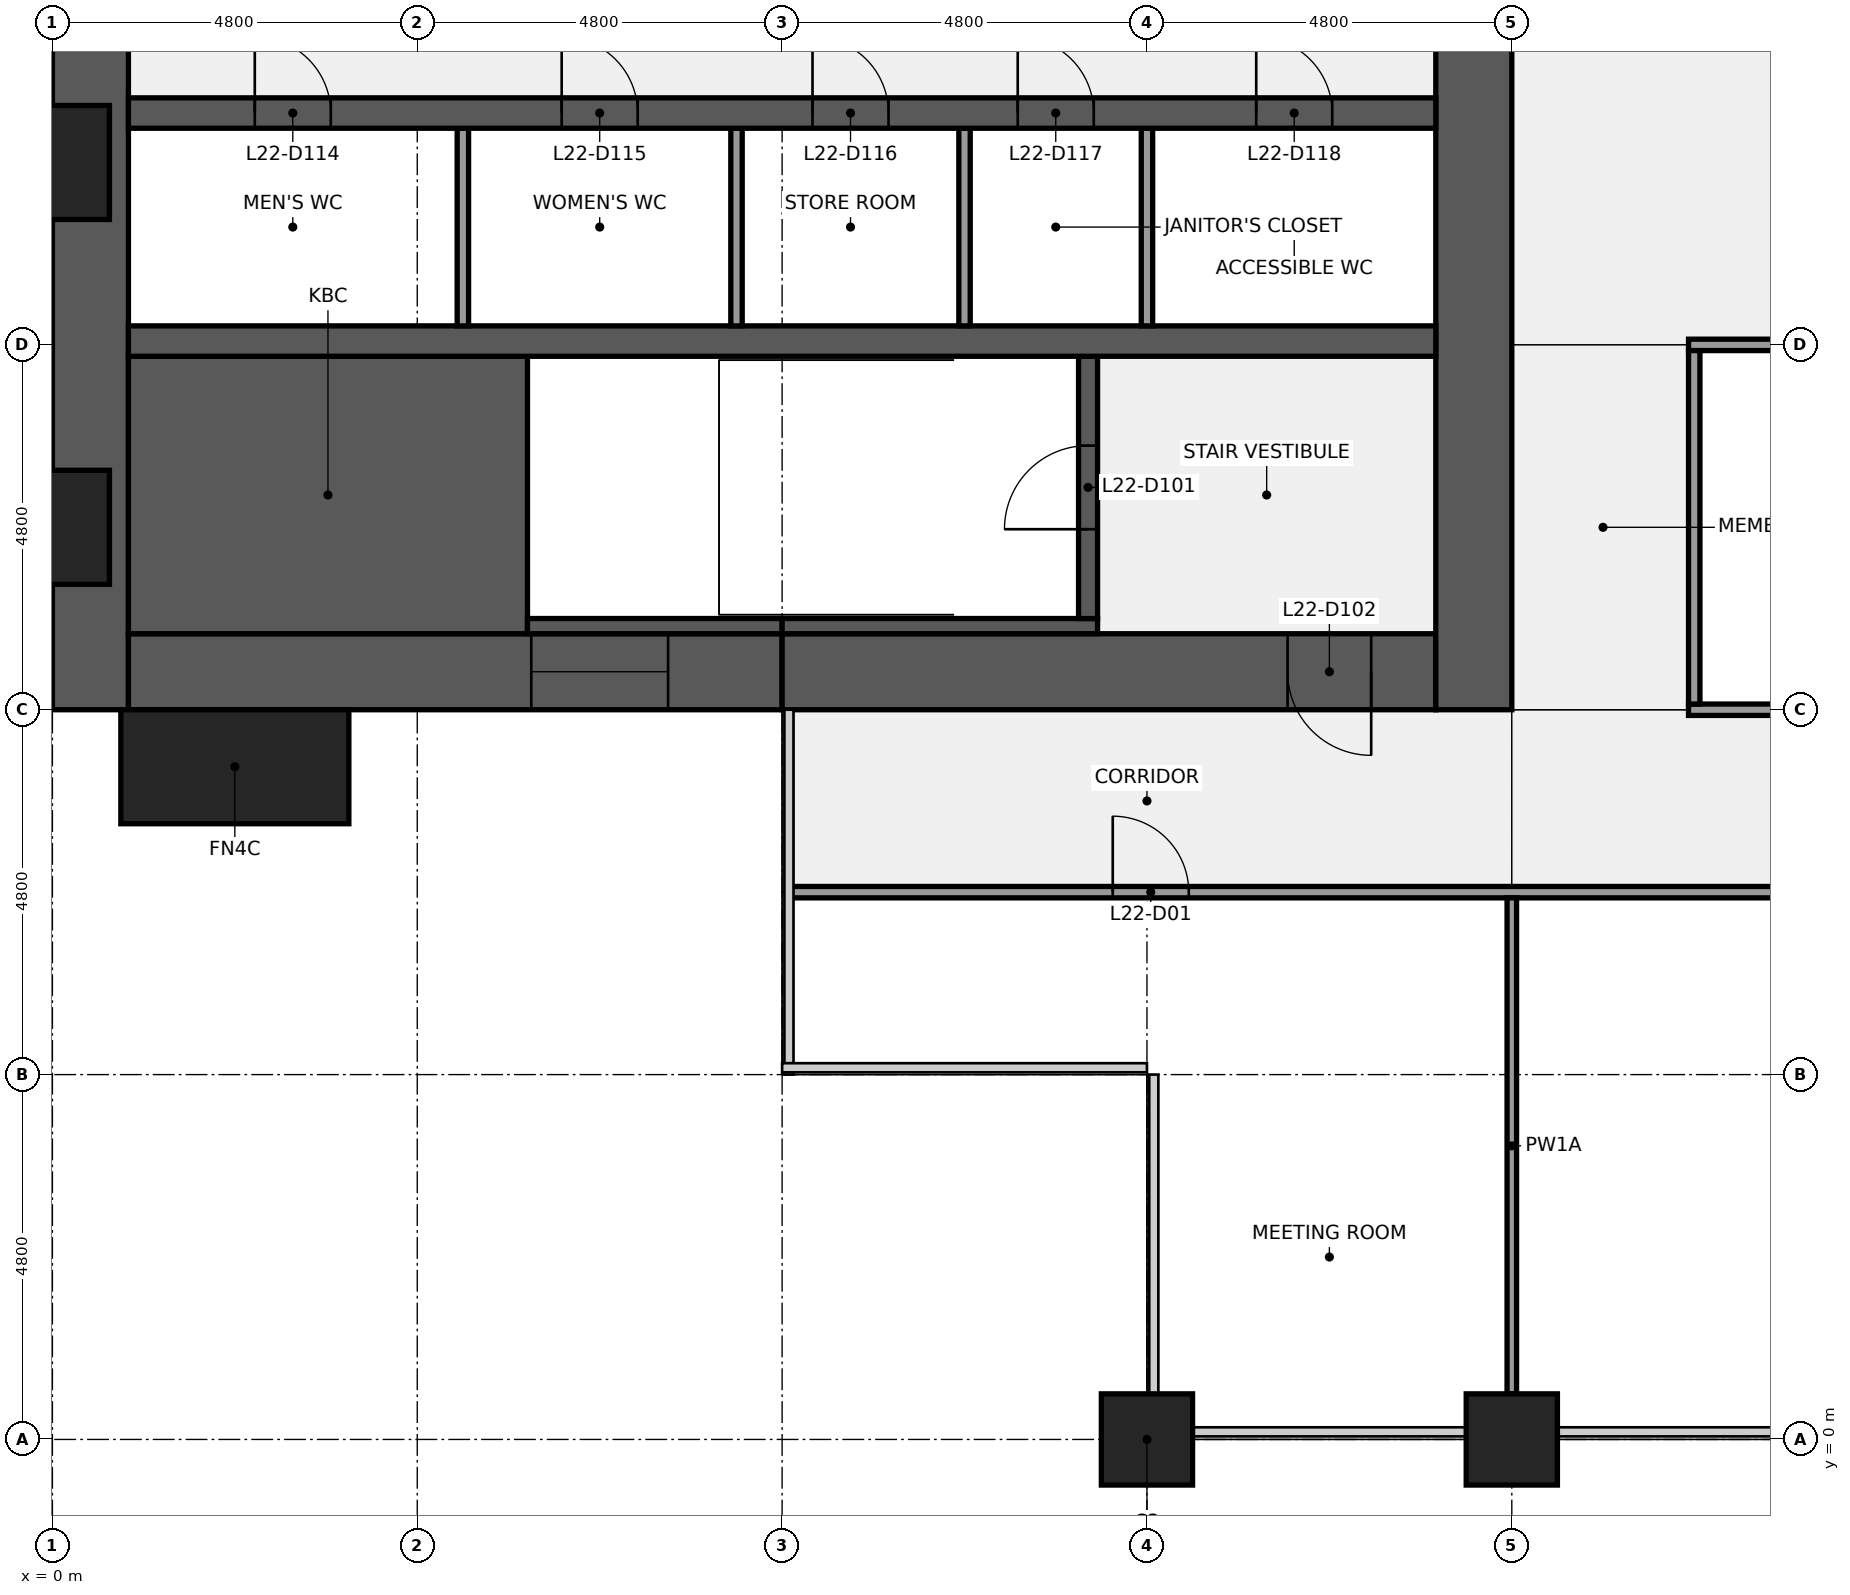
"""IFC4 building model, lengths in metres.
Left out: names, types, materials, properties, quantities, classifications, styles, units other than length and angle.
Written with IfcOpenShell. Run it as: python <this file> out.ifc"""

import sys

from ifc_helpers import new_model, si_unit, direction, frame, frame_2d, origin, origin_2d, place, context, subcontext, project, spatial, rectangle, extrude, element, fill, save


model = new_model("IFC4")
c1 = context("Model", 3, precision=1e-05, world=origin(), true_north=direction((0.0, 1.0)))
c2 = subcontext(c1, "Body", "Model", "MODEL_VIEW")
j1 = project(units=[si_unit("LENGTHUNIT", "METRE"), si_unit("PLANEANGLEUNIT", "RADIAN")], contexts=[c1])
p1 = place(None, origin())
s1 = spatial("IfcSite", under=j1, at=p1, CompositionType="ELEMENT")
p2 = place(p1, origin())
s2 = spatial("IfcBuilding", under=s1, at=p2, CompositionType="ELEMENT")
p3 = place(p2, frame((0.0, 0.0, 108.1)))
s3 = spatial("IfcBuildingStorey", under=s2, at=p3, CompositionType="ELEMENT", Elevation=108.1)
for number, where, z_axis, x_axis in (
    (1, (14.4, 0.0, 0.0), (0.0, 0.0, 1.0), (1.0, 0.0, 0.0)),
    (2, (19.2, 0.0, 0.0), (0.0, 0.0, 1.0), (1.0, 0.0, 0.0)),
):
    element("IfcColumn", number, at=place(p3, frame(where, z_axis=z_axis, x_axis=x_axis)), inside=s3, PredefinedType="COLUMN", context=c2, shape_type="SweptSolid", body=[
        extrude(rectangle(XDim=1.2, YDim=1.2, at=origin_2d()), origin(), (0.0, 0.0, 1.0), 4.0),
    ])
p4 = place(p3, frame((0.5, 9.6, 0.0), z_axis=(0.0, 0.0, 1.0), x_axis=(0.0, 1.0, 0.0)))
e3 = element("IfcWall", 3, at=p4, inside=s3, PredefinedType="SHEAR", context=c2, shape_type="SweptSolid", body=[
    extrude(rectangle(XDim=28.8, YDim=1.0, at=frame_2d((14.4, 0.0))), origin(), (0.0, 0.0, 1.0), 3.84),
])
p5 = place(p4, frame((8.85, 0.0, 0.9)))
e4 = element("IfcOpeningElement", 4, at=p5, cuts=e3, PredefinedType="OPENING", context=c2, shape_type="SweptSolid", body=[
    extrude(rectangle(XDim=1.5, YDim=1.5, at=frame_2d((0.75, 0.75))), frame((0.0, 0.51, 0.0), z_axis=(0.0, -1.0, 0.0), x_axis=(1.0, 0.0, 0.0)), (0.0, 0.0, 1.0), 1.02),
])
p6 = place(p4, frame((18.45, 0.0, 0.9)))
e5 = element("IfcOpeningElement", 5, at=p6, cuts=e3, PredefinedType="OPENING", context=c2, shape_type="SweptSolid", body=[
    extrude(rectangle(XDim=1.5, YDim=1.5, at=frame_2d((0.75, 0.75))), frame((0.0, 0.51, 0.0), z_axis=(0.0, -1.0, 0.0), x_axis=(1.0, 0.0, 0.0)), (0.0, 0.0, 1.0), 1.02),
])
p7 = place(p3, frame((9.6, 10.1, 0.0), z_axis=(0.0, 0.0, 1.0), x_axis=(-1.0, 0.0, 0.0)))
e6 = element("IfcWall", 6, at=p7, inside=s3, PredefinedType="SHEAR", context=c2, shape_type="SweptSolid", body=[
    extrude(rectangle(XDim=8.6, YDim=1.0, at=frame_2d((4.3, 0.0))), origin(), (0.0, 0.0, 1.0), 3.84),
])
p8 = place(p7, frame((1.5, 0.0, 0.9)))
e7 = element("IfcOpeningElement", 7, at=p8, cuts=e6, PredefinedType="OPENING", context=c2, shape_type="SweptSolid", body=[
    extrude(rectangle(XDim=1.8, YDim=1.5, at=frame_2d((0.9, 0.75))), frame((0.0, 0.51, 0.0), z_axis=(0.0, -1.0, 0.0), x_axis=(1.0, 0.0, 0.0)), (0.0, 0.0, 1.0), 1.02),
])
p9 = place(p3, frame((18.2, 10.1, 0.0), z_axis=(0.0, 0.0, 1.0), x_axis=(-1.0, 0.0, 0.0)))
e8 = element("IfcWall", 8, at=p9, inside=s3, PredefinedType="SHEAR", context=c2, shape_type="SweptSolid", body=[
    extrude(rectangle(XDim=8.6, YDim=1.0, at=frame_2d((4.3, 0.0))), origin(), (0.0, 0.0, 1.0), 3.84),
])
p10 = place(p9, frame((0.85, 0.0, 0.0)))
e9 = element("IfcOpeningElement", 9, at=p10, cuts=e8, PredefinedType="OPENING", context=c2, shape_type="SweptSolid", body=[
    extrude(rectangle(XDim=1.1, YDim=2.1, at=frame_2d((0.55, 1.05))), frame((0.0, 0.51, 0.0), z_axis=(0.0, -1.0, 0.0), x_axis=(1.0, 0.0, 0.0)), (0.0, 0.0, 1.0), 1.02),
])
p11 = place(p3, frame((18.7, 38.4, 0.0), z_axis=(0.0, 0.0, 1.0), x_axis=(0.0, -1.0, 0.0)))
e10 = element("IfcWall", 10, at=p11, inside=s3, PredefinedType="SHEAR", context=c2, shape_type="SweptSolid", body=[
    extrude(rectangle(XDim=28.8, YDim=1.0, at=frame_2d((14.4, 0.0))), origin(), (0.0, 0.0, 1.0), 3.84),
])
p12 = place(p11, frame((18.3, 0.0, 0.0)))
e11 = element("IfcOpeningElement", 11, at=p12, cuts=e10, PredefinedType="OPENING", context=c2, shape_type="SweptSolid", body=[
    extrude(rectangle(XDim=1.8, YDim=2.1, at=frame_2d((0.9, 1.05))), frame((0.0, 0.51, 0.0), z_axis=(0.0, -1.0, 0.0), x_axis=(1.0, 0.0, 0.0)), (0.0, 0.0, 1.0), 1.02),
])
p13 = place(p11, frame((8.7, 0.0, 0.0)))
e12 = element("IfcOpeningElement", 12, at=p13, cuts=e10, PredefinedType="OPENING", context=c2, shape_type="SweptSolid", body=[
    extrude(rectangle(XDim=1.8, YDim=2.1, at=frame_2d((0.9, 1.05))), frame((0.0, 0.51, 0.0), z_axis=(0.0, -1.0, 0.0), x_axis=(1.0, 0.0, 0.0)), (0.0, 0.0, 1.0), 1.02),
])
p14 = place(p3, frame((1.0, 12.425, 0.0), z_axis=(0.0, 0.0, 1.0), x_axis=(1.0, 0.0, 0.0)))
e13 = element("IfcWall", 13, at=p14, inside=s3, PredefinedType="SHEAR", context=c2, shape_type="SweptSolid", body=[
    extrude(rectangle(XDim=5.25, YDim=3.65, at=frame_2d((2.625, 0.0))), origin(), (0.0, 0.0, 1.0), 3.84),
])
p15 = place(p3, frame((6.25, 10.7, 0.0), z_axis=(0.0, 0.0, 1.0), x_axis=(1.0, 0.0, 0.0)))
e14 = element("IfcWall", 14, at=p15, inside=s3, PredefinedType="SHEAR", context=c2, shape_type="SweptSolid", body=[
    extrude(rectangle(XDim=3.35, YDim=0.2, at=frame_2d((1.675, 0.0))), origin(), (0.0, 0.0, 1.0), 3.84),
])
p16 = place(p3, frame((9.6, 10.7, 0.0), z_axis=(0.0, 0.0, 1.0), x_axis=(1.0, 0.0, 0.0)))
e15 = element("IfcWall", 15, at=p16, inside=s3, PredefinedType="SHEAR", context=c2, shape_type="SweptSolid", body=[
    extrude(rectangle(XDim=4.15, YDim=0.2, at=frame_2d((2.075, 0.0))), origin(), (0.0, 0.0, 1.0), 3.84),
])
p17 = place(p3, frame((13.625, 10.8, 0.0), z_axis=(0.0, 0.0, 1.0), x_axis=(0.0, 1.0, 0.0)))
e16 = element("IfcWall", 16, at=p17, inside=s3, PredefinedType="SHEAR", context=c2, shape_type="SweptSolid", body=[
    extrude(rectangle(XDim=3.45, YDim=0.25, at=frame_2d((1.725, 0.0))), origin(), (0.0, 0.0, 1.0), 3.84),
])
p18 = place(p17, frame((1.175, 0.0, 0.0)))
e17 = element("IfcOpeningElement", 17, at=p18, cuts=e16, PredefinedType="OPENING", context=c2, shape_type="SweptSolid", body=[
    extrude(rectangle(XDim=1.1, YDim=2.1, at=frame_2d((0.55, 1.05))), frame((0.0, 0.135, 0.0), z_axis=(0.0, -1.0, 0.0), x_axis=(1.0, 0.0, 0.0)), (0.0, 0.0, 1.0), 0.27),
])
p19 = place(p3, frame((1.0, 14.45, 0.0), z_axis=(0.0, 0.0, 1.0), x_axis=(1.0, 0.0, 0.0)))
e18 = element("IfcWall", 18, at=p19, inside=s3, PredefinedType="SHEAR", context=c2, shape_type="SweptSolid", body=[
    extrude(rectangle(XDim=17.2, YDim=0.4, at=frame_2d((8.6, 0.0))), origin(), (0.0, 0.0, 1.0), 3.84),
])
for number, where, z_axis, x_axis in (
    (19, (5.4, 14.65, 0.0), (0.0, 0.0, 1.0), (0.0, 1.0, 0.0)),
    (20, (9.0, 14.65, 0.0), (0.0, 0.0, 1.0), (0.0, 1.0, 0.0)),
    (21, (12.0, 14.65, 0.0), (0.0, 0.0, 1.0), (0.0, 1.0, 0.0)),
    (22, (14.4, 14.65, 0.0), (0.0, 0.0, 1.0), (0.0, 1.0, 0.0)),
):
    element("IfcWall", number, at=place(p3, frame(where, z_axis=z_axis, x_axis=x_axis)), inside=s3, PredefinedType="PARTITIONING", context=c2, shape_type="SweptSolid", body=[
        extrude(rectangle(XDim=2.6, YDim=0.15, at=frame_2d((1.3, 0.0))), origin(), (0.0, 0.0, 1.0), 3.84),
    ])
p20 = place(p3, frame((1.0, 17.45, 0.0), z_axis=(0.0, 0.0, 1.0), x_axis=(1.0, 0.0, 0.0)))
e23 = element("IfcWall", 23, at=p20, inside=s3, PredefinedType="SHEAR", context=c2, shape_type="SweptSolid", body=[
    extrude(rectangle(XDim=17.2, YDim=0.4, at=frame_2d((8.6, 0.0))), origin(), (0.0, 0.0, 1.0), 3.84),
])
p21 = place(p20, frame((1.663, 0.0, 0.0)))
e24 = element("IfcOpeningElement", 24, at=p21, cuts=e23, PredefinedType="OPENING", context=c2, shape_type="SweptSolid", body=[
    extrude(rectangle(XDim=1.0, YDim=2.1, at=frame_2d((0.5, 1.05))), frame((0.0, 0.21, 0.0), z_axis=(0.0, -1.0, 0.0), x_axis=(1.0, 0.0, 0.0)), (0.0, 0.0, 1.0), 0.42),
])
p22 = place(p20, frame((5.7, 0.0, 0.0)))
e25 = element("IfcOpeningElement", 25, at=p22, cuts=e23, PredefinedType="OPENING", context=c2, shape_type="SweptSolid", body=[
    extrude(rectangle(XDim=1.0, YDim=2.1, at=frame_2d((0.5, 1.05))), frame((0.0, 0.21, 0.0), z_axis=(0.0, -1.0, 0.0), x_axis=(1.0, 0.0, 0.0)), (0.0, 0.0, 1.0), 0.42),
])
p23 = place(p20, frame((9.0, 0.0, 0.0)))
e26 = element("IfcOpeningElement", 26, at=p23, cuts=e23, PredefinedType="OPENING", context=c2, shape_type="SweptSolid", body=[
    extrude(rectangle(XDim=1.0, YDim=2.1, at=frame_2d((0.5, 1.05))), frame((0.0, 0.21, 0.0), z_axis=(0.0, -1.0, 0.0), x_axis=(1.0, 0.0, 0.0)), (0.0, 0.0, 1.0), 0.42),
])
p24 = place(p20, frame((11.7, 0.0, 0.0)))
e27 = element("IfcOpeningElement", 27, at=p24, cuts=e23, PredefinedType="OPENING", context=c2, shape_type="SweptSolid", body=[
    extrude(rectangle(XDim=1.0, YDim=2.1, at=frame_2d((0.5, 1.05))), frame((0.0, 0.21, 0.0), z_axis=(0.0, -1.0, 0.0), x_axis=(1.0, 0.0, 0.0)), (0.0, 0.0, 1.0), 0.42),
])
p25 = place(p20, frame((14.837, 0.0, 0.0)))
e28 = element("IfcOpeningElement", 28, at=p25, cuts=e23, PredefinedType="OPENING", context=c2, shape_type="SweptSolid", body=[
    extrude(rectangle(XDim=1.0, YDim=2.1, at=frame_2d((0.5, 1.05))), frame((0.0, 0.21, 0.0), z_axis=(0.0, -1.0, 0.0), x_axis=(1.0, 0.0, 0.0)), (0.0, 0.0, 1.0), 0.42),
])
p26 = place(p3, frame((9.7, 7.2, 0.0), z_axis=(0.0, 0.0, 1.0), x_axis=(1.0, 0.0, 0.0)))
e29 = element("IfcWall", 29, at=p26, inside=s3, PredefinedType="PARTITIONING", context=c2, shape_type="SweptSolid", body=[
    extrude(rectangle(XDim=38.375, YDim=0.15, at=frame_2d((19.188, 0.0))), origin(), (0.0, 0.0, 1.0), 2.936),
])
p27 = place(p26, frame((4.25, 0.0, 0.0)))
e30 = element("IfcOpeningElement", 30, at=p27, cuts=e29, PredefinedType="OPENING", context=c2, shape_type="SweptSolid", body=[
    extrude(rectangle(XDim=1.0, YDim=2.1, at=frame_2d((0.5, 1.05))), frame((0.0, 0.085, 0.0), z_axis=(0.0, -1.0, 0.0), x_axis=(1.0, 0.0, 0.0)), (0.0, 0.0, 1.0), 0.17),
])
p28 = place(p26, frame((13.8, 0.0, 0.0)))
e31 = element("IfcOpeningElement", 31, at=p28, cuts=e29, PredefinedType="OPENING", context=c2, shape_type="SweptSolid", body=[
    extrude(rectangle(XDim=1.0, YDim=2.1, at=frame_2d((0.5, 1.05))), frame((0.0, 0.085, 0.0), z_axis=(0.0, -1.0, 0.0), x_axis=(1.0, 0.0, 0.0)), (0.0, 0.0, 1.0), 0.17),
])
p29 = place(p26, frame((23.4, 0.0, 0.0)))
e32 = element("IfcOpeningElement", 32, at=p29, cuts=e29, PredefinedType="OPENING", context=c2, shape_type="SweptSolid", body=[
    extrude(rectangle(XDim=1.0, YDim=2.1, at=frame_2d((0.5, 1.05))), frame((0.0, 0.085, 0.0), z_axis=(0.0, -1.0, 0.0), x_axis=(1.0, 0.0, 0.0)), (0.0, 0.0, 1.0), 0.17),
])
p30 = place(p26, frame((33.0, 0.0, 0.0)))
e33 = element("IfcOpeningElement", 33, at=p30, cuts=e29, PredefinedType="OPENING", context=c2, shape_type="SweptSolid", body=[
    extrude(rectangle(XDim=1.0, YDim=2.1, at=frame_2d((0.5, 1.05))), frame((0.0, 0.085, 0.0), z_axis=(0.0, -1.0, 0.0), x_axis=(1.0, 0.0, 0.0)), (0.0, 0.0, 1.0), 0.17),
])
p31 = place(p3, frame((21.525, 9.6, 0.0), z_axis=(0.0, 0.0, 1.0), x_axis=(1.0, 0.0, 0.0)))
e34 = element("IfcWall", 34, at=p31, inside=s3, PredefinedType="PARTITIONING", context=c2, shape_type="SweptSolid", body=[
    extrude(rectangle(XDim=14.55, YDim=0.15, at=frame_2d((7.275, 0.0))), origin(), (0.0, 0.0, 1.0), 2.936),
])
p32 = place(p31, frame((3.175, 0.0, 0.0)))
e35 = element("IfcOpeningElement", 35, at=p32, cuts=e34, PredefinedType="OPENING", context=c2, shape_type="SweptSolid", body=[
    extrude(rectangle(XDim=1.0, YDim=2.1, at=frame_2d((0.5, 1.05))), frame((0.0, 0.085, 0.0), z_axis=(0.0, -1.0, 0.0), x_axis=(1.0, 0.0, 0.0)), (0.0, 0.0, 1.0), 0.17),
])
p33 = place(p31, frame((10.375, 0.0, 0.0)))
e36 = element("IfcOpeningElement", 36, at=p33, cuts=e34, PredefinedType="OPENING", context=c2, shape_type="SweptSolid", body=[
    extrude(rectangle(XDim=1.0, YDim=2.1, at=frame_2d((0.5, 1.05))), frame((0.0, 0.085, 0.0), z_axis=(0.0, -1.0, 0.0), x_axis=(1.0, 0.0, 0.0)), (0.0, 0.0, 1.0), 0.17),
])
p34 = place(p3, frame((21.525, 14.4, 0.0), z_axis=(0.0, 0.0, 1.0), x_axis=(1.0, 0.0, 0.0)))
e37 = element("IfcWall", 37, at=p34, inside=s3, PredefinedType="PARTITIONING", context=c2, shape_type="SweptSolid", body=[
    extrude(rectangle(XDim=4.95, YDim=0.15, at=frame_2d((2.475, 0.0))), origin(), (0.0, 0.0, 1.0), 2.936),
])
p35 = place(p3, frame((19.2, 0.6, 0.0), z_axis=(0.0, 0.0, 1.0), x_axis=(0.0, 1.0, 0.0)))
e38 = element("IfcWall", 38, at=p35, inside=s3, PredefinedType="PARTITIONING", context=c2, shape_type="SweptSolid", body=[
    extrude(rectangle(XDim=6.525, YDim=0.125, at=frame_2d((3.262, 0.0))), origin(), (0.0, 0.0, 1.0), 2.936),
])
p36 = place(p3, frame((21.6, 9.675, 0.0), z_axis=(0.0, 0.0, 1.0), x_axis=(0.0, 1.0, 0.0)))
e39 = element("IfcWall", 39, at=p36, inside=s3, PredefinedType="PARTITIONING", context=c2, shape_type="SweptSolid", body=[
    extrude(rectangle(XDim=4.65, YDim=0.15, at=frame_2d((2.325, 0.0))), origin(), (0.0, 0.0, 1.0), 2.936),
])
p37 = place(p3, frame((2.4, 8.85, 0.0), z_axis=(0.0, 0.0, 1.0), x_axis=(1.0, 0.0, 0.0)))
e40 = element("IfcColumn", 40, at=p37, inside=s3, PredefinedType="PILASTER", context=c2, shape_type="SweptSolid", body=[
    extrude(rectangle(XDim=3.0, YDim=1.5, at=origin_2d()), origin(), (0.0, 0.0, 1.0), 4.0),
])
for number, where, z_axis, x_axis in (
    (41, (14.4, -1.05, 0.0), (0.0, 0.0, 1.0), (1.0, 0.0, 0.0)),
    (42, (19.2, -1.05, 0.0), (0.0, 0.0, 1.0), (1.0, 0.0, 0.0)),
):
    element("IfcColumn", number, at=place(p3, frame(where, z_axis=z_axis, x_axis=x_axis)), inside=s3, PredefinedType="PILASTER", context=c2, shape_type="SweptSolid", body=[
        extrude(rectangle(XDim=3.6, YDim=0.9, at=origin_2d()), origin(), (0.0, 0.0, 1.0), 4.0),
    ])
p38 = place(p18, origin())
e43 = element("IfcDoor", 43, at=p38, inside=s3, OperationType="SINGLE_SWING_LEFT", PredefinedType="DOOR", context=c2, shape_type="SweptSolid", body=[
    extrude(rectangle(XDim=1.1, YDim=2.1, at=frame_2d((0.55, 1.05))), frame((0.0, 0.025, 0.0), z_axis=(0.0, -1.0, 0.0), x_axis=(1.0, 0.0, 0.0)), (0.0, 0.0, 1.0), 0.05),
])
fill(e17, e43)
p39 = place(p10, origin())
e44 = element("IfcDoor", 44, at=p39, inside=s3, OperationType="SINGLE_SWING_LEFT", PredefinedType="DOOR", context=c2, shape_type="SweptSolid", body=[
    extrude(rectangle(XDim=1.1, YDim=2.1, at=frame_2d((0.55, 1.05))), frame((0.0, 0.025, 0.0), z_axis=(0.0, -1.0, 0.0), x_axis=(1.0, 0.0, 0.0)), (0.0, 0.0, 1.0), 0.05),
])
fill(e9, e44)
p40 = place(p21, origin())
e45 = element("IfcDoor", 45, at=p40, inside=s3, OperationType="SINGLE_SWING_LEFT", PredefinedType="DOOR", context=c2, shape_type="SweptSolid", body=[
    extrude(rectangle(XDim=1.0, YDim=2.1, at=frame_2d((0.5, 1.05))), frame((0.0, 0.025, 0.0), z_axis=(0.0, -1.0, 0.0), x_axis=(1.0, 0.0, 0.0)), (0.0, 0.0, 1.0), 0.05),
])
fill(e24, e45)
p41 = place(p22, origin())
e46 = element("IfcDoor", 46, at=p41, inside=s3, OperationType="SINGLE_SWING_LEFT", PredefinedType="DOOR", context=c2, shape_type="SweptSolid", body=[
    extrude(rectangle(XDim=1.0, YDim=2.1, at=frame_2d((0.5, 1.05))), frame((0.0, 0.025, 0.0), z_axis=(0.0, -1.0, 0.0), x_axis=(1.0, 0.0, 0.0)), (0.0, 0.0, 1.0), 0.05),
])
fill(e25, e46)
p42 = place(p23, origin())
e47 = element("IfcDoor", 47, at=p42, inside=s3, OperationType="SINGLE_SWING_LEFT", PredefinedType="DOOR", context=c2, shape_type="SweptSolid", body=[
    extrude(rectangle(XDim=1.0, YDim=2.1, at=frame_2d((0.5, 1.05))), frame((0.0, 0.025, 0.0), z_axis=(0.0, -1.0, 0.0), x_axis=(1.0, 0.0, 0.0)), (0.0, 0.0, 1.0), 0.05),
])
fill(e26, e47)
p43 = place(p24, origin())
e48 = element("IfcDoor", 48, at=p43, inside=s3, OperationType="SINGLE_SWING_LEFT", PredefinedType="DOOR", context=c2, shape_type="SweptSolid", body=[
    extrude(rectangle(XDim=1.0, YDim=2.1, at=frame_2d((0.5, 1.05))), frame((0.0, 0.025, 0.0), z_axis=(0.0, -1.0, 0.0), x_axis=(1.0, 0.0, 0.0)), (0.0, 0.0, 1.0), 0.05),
])
fill(e27, e48)
p44 = place(p25, origin())
e49 = element("IfcDoor", 49, at=p44, inside=s3, OperationType="SINGLE_SWING_LEFT", PredefinedType="DOOR", context=c2, shape_type="SweptSolid", body=[
    extrude(rectangle(XDim=1.0, YDim=2.1, at=frame_2d((0.5, 1.05))), frame((0.0, 0.025, 0.0), z_axis=(0.0, -1.0, 0.0), x_axis=(1.0, 0.0, 0.0)), (0.0, 0.0, 1.0), 0.05),
])
fill(e28, e49)
p45 = place(p8, origin())
e50 = element("IfcWindow", 50, at=p45, inside=s3, PartitioningType="SINGLE_PANEL", PredefinedType="WINDOW", context=c2, shape_type="SweptSolid", body=[
    extrude(rectangle(XDim=1.8, YDim=1.5, at=frame_2d((0.9, 0.75))), frame((0.0, 0.03, 0.0), z_axis=(0.0, -1.0, 0.0), x_axis=(1.0, 0.0, 0.0)), (0.0, 0.0, 1.0), 0.06),
])
fill(e7, e50)
p46 = place(p27, origin())
e51 = element("IfcDoor", 51, at=p46, inside=s3, OperationType="SINGLE_SWING_LEFT", PredefinedType="DOOR", context=c2, shape_type="SweptSolid", body=[
    extrude(rectangle(XDim=1.0, YDim=2.1, at=frame_2d((0.5, 1.05))), frame((0.0, 0.025, 0.0), z_axis=(0.0, -1.0, 0.0), x_axis=(1.0, 0.0, 0.0)), (0.0, 0.0, 1.0), 0.05),
])
fill(e30, e51)
save(model, sys.argv[1])
